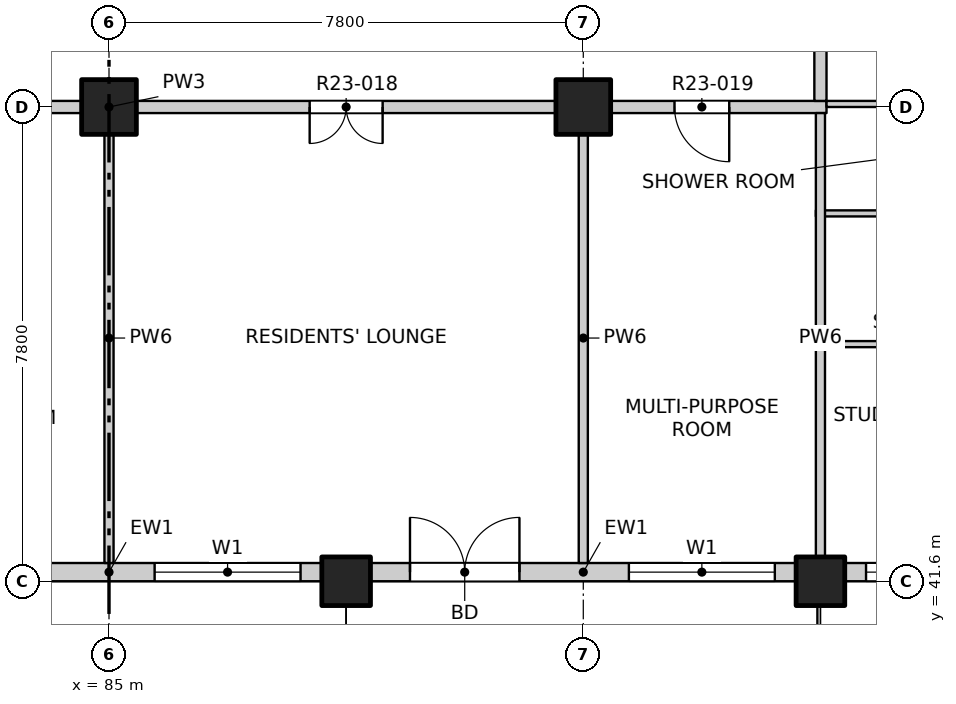
"""IFC4 building model, lengths in metres.
Left out: names, types, materials, properties, quantities, classifications, styles, units other than length and angle.
Written with IfcOpenShell. Run it as: python <this file> out.ifc"""

import sys

from ifc_helpers import new_model, si_unit, direction, frame, frame_2d, origin, origin_2d, place, context, subcontext, project, spatial, rectangle, extrude, element, fill, save


model = new_model("IFC4")
c1 = context("Model", 3, precision=1e-05, world=origin(), true_north=direction((0.0, 1.0)))
c2 = subcontext(c1, "Body", "Model", "MODEL_VIEW")
j1 = project(units=[si_unit("LENGTHUNIT", "METRE"), si_unit("PLANEANGLEUNIT", "RADIAN")], contexts=[c1])
p1 = place(None, origin())
s1 = spatial("IfcSite", under=j1, at=p1, CompositionType="ELEMENT")
p2 = place(p1, origin())
s2 = spatial("IfcBuilding", under=s1, at=p2, CompositionType="ELEMENT")
p3 = place(p2, frame((0.0, 0.0, 234.7)))
s3 = spatial("IfcBuildingStorey", under=s2, at=p3, CompositionType="ELEMENT", Elevation=234.7)
for number, where, z_axis, x_axis in (
    (1, (88.9, 41.6, -0.25), (0.0, 0.0, 1.0), (1.0, 0.0, 0.0)),
    (2, (96.7, 41.6, -0.25), (0.0, 0.0, 1.0), (1.0, 0.0, 0.0)),
):
    element("IfcColumn", number, at=place(p3, frame(where, z_axis=z_axis, x_axis=x_axis)), inside=s3, PredefinedType="COLUMN", context=c2, shape_type="SweptSolid", body=[
        extrude(rectangle(XDim=0.8, YDim=0.8, at=origin_2d()), origin(), (0.0, 0.0, 1.0), 3.4),
    ])
for number, where, z_axis, x_axis in (
    (3, (85.0, 49.4, -0.25), (0.0, 0.0, 1.0), (1.0, 0.0, 0.0)),
    (4, (92.8, 49.4, -0.25), (0.0, 0.0, 1.0), (1.0, 0.0, 0.0)),
):
    element("IfcColumn", number, at=place(p3, frame(where, z_axis=z_axis, x_axis=x_axis)), inside=s3, PredefinedType="COLUMN", context=c2, shape_type="SweptSolid", body=[
        extrude(rectangle(XDim=0.9, YDim=0.9, at=origin_2d()), origin(), (0.0, 0.0, 1.0), 3.4),
    ])
p4 = place(p3, frame((81.5, 41.75, 0.0), z_axis=(0.0, 0.0, 1.0), x_axis=(1.0, 0.0, 0.0)))
e5 = element("IfcWall", 5, at=p4, inside=s3, PredefinedType="SOLIDWALL", context=c2, shape_type="SweptSolid", body=[
    extrude(rectangle(XDim=7.0, YDim=0.3, at=frame_2d((3.5, 0.0))), origin(), (0.0, 0.0, 1.0), 2.7),
])
p5 = place(p4, frame((0.65, 0.0, 0.0)))
e6 = element("IfcOpeningElement", 6, at=p5, cuts=e5, PredefinedType="OPENING", context=c2, shape_type="SweptSolid", body=[
    extrude(rectangle(XDim=1.8, YDim=2.4, at=frame_2d((0.9, 1.2))), frame((0.0, 0.16, 0.0), z_axis=(0.0, -1.0, 0.0), x_axis=(1.0, 0.0, 0.0)), (0.0, 0.0, 1.0), 0.32),
])
p6 = place(p4, frame((4.25, 0.0, 0.9)))
e7 = element("IfcOpeningElement", 7, at=p6, cuts=e5, PredefinedType="OPENING", context=c2, shape_type="SweptSolid", body=[
    extrude(rectangle(XDim=2.4, YDim=1.8, at=frame_2d((1.2, 0.9))), frame((0.0, 0.16, 0.0), z_axis=(0.0, -1.0, 0.0), x_axis=(1.0, 0.0, 0.0)), (0.0, 0.0, 1.0), 0.32),
])
p7 = place(p3, frame((89.3, 41.75, 0.0), z_axis=(0.0, 0.0, 1.0), x_axis=(1.0, 0.0, 0.0)))
e8 = element("IfcWall", 8, at=p7, inside=s3, PredefinedType="SOLIDWALL", context=c2, shape_type="SweptSolid", body=[
    extrude(rectangle(XDim=7.0, YDim=0.3, at=frame_2d((3.5, 0.0))), origin(), (0.0, 0.0, 1.0), 2.7),
])
p8 = place(p7, frame((0.65, 0.0, 0.0)))
e9 = element("IfcOpeningElement", 9, at=p8, cuts=e8, PredefinedType="OPENING", context=c2, shape_type="SweptSolid", body=[
    extrude(rectangle(XDim=1.8, YDim=2.4, at=frame_2d((0.9, 1.2))), frame((0.0, 0.16, 0.0), z_axis=(0.0, -1.0, 0.0), x_axis=(1.0, 0.0, 0.0)), (0.0, 0.0, 1.0), 0.32),
])
p9 = place(p7, frame((4.25, 0.0, 0.9)))
e10 = element("IfcOpeningElement", 10, at=p9, cuts=e8, PredefinedType="OPENING", context=c2, shape_type="SweptSolid", body=[
    extrude(rectangle(XDim=2.4, YDim=1.8, at=frame_2d((1.2, 0.9))), frame((0.0, 0.16, 0.0), z_axis=(0.0, -1.0, 0.0), x_axis=(1.0, 0.0, 0.0)), (0.0, 0.0, 1.0), 0.32),
])
p10 = place(p3, frame((97.1, 41.75, 0.0), z_axis=(0.0, 0.0, 1.0), x_axis=(1.0, 0.0, 0.0)))
e11 = element("IfcWall", 11, at=p10, inside=s3, PredefinedType="SOLIDWALL", context=c2, shape_type="SweptSolid", body=[
    extrude(rectangle(XDim=7.4, YDim=0.3, at=frame_2d((3.7, 0.0))), origin(), (0.0, 0.0, 1.0), 2.7),
])
p11 = place(p10, frame((0.35, 0.0, 0.9)))
e12 = element("IfcOpeningElement", 12, at=p11, cuts=e11, PredefinedType="OPENING", context=c2, shape_type="SweptSolid", body=[
    extrude(rectangle(XDim=2.4, YDim=1.8, at=frame_2d((1.2, 0.9))), frame((0.0, 0.16, 0.0), z_axis=(0.0, -1.0, 0.0), x_axis=(1.0, 0.0, 0.0)), (0.0, 0.0, 1.0), 0.32),
])
p12 = place(p10, frame((4.25, 0.0, 0.9)))
e13 = element("IfcOpeningElement", 13, at=p12, cuts=e11, PredefinedType="OPENING", context=c2, shape_type="SweptSolid", body=[
    extrude(rectangle(XDim=2.4, YDim=1.8, at=frame_2d((1.2, 0.9))), frame((0.0, 0.16, 0.0), z_axis=(0.0, -1.0, 0.0), x_axis=(1.0, 0.0, 0.0)), (0.0, 0.0, 1.0), 0.32),
])
p13 = place(p3, frame((96.625, 45.5, 0.0), z_axis=(0.0, 0.0, 1.0), x_axis=(1.0, 0.0, 0.0)))
e14 = element("IfcWall", 14, at=p13, inside=s3, PredefinedType="PARTITIONING", context=c2, shape_type="SweptSolid", body=[
    extrude(rectangle(XDim=11.475, YDim=0.1, at=frame_2d((5.738, 0.0))), origin(), (0.0, 0.0, 1.0), 3.15),
])
p14 = place(p13, frame((2.61, 0.0, 0.0)))
e15 = element("IfcOpeningElement", 15, at=p14, cuts=e14, PredefinedType="OPENING", context=c2, shape_type="SweptSolid", body=[
    extrude(rectangle(XDim=0.9, YDim=2.1, at=frame_2d((0.45, 1.05))), frame((0.0, 0.06, 0.0), z_axis=(0.0, -1.0, 0.0), x_axis=(1.0, 0.0, 0.0)), (0.0, 0.0, 1.0), 0.12),
])
p15 = place(p3, frame((96.625, 47.65, 0.0), z_axis=(0.0, 0.0, 1.0), x_axis=(1.0, 0.0, 0.0)))
e16 = element("IfcWall", 16, at=p15, inside=s3, PredefinedType="PARTITIONING", context=c2, shape_type="SweptSolid", body=[
    extrude(rectangle(XDim=2.195, YDim=0.1, at=frame_2d((1.098, 0.0))), origin(), (0.0, 0.0, 1.0), 3.15),
])
p16 = place(p3, frame((73.2, 49.4, 0.0), z_axis=(0.0, 0.0, 1.0), x_axis=(1.0, 0.0, 0.0)))
e17 = element("IfcWall", 17, at=p16, inside=s3, PredefinedType="PARTITIONING", context=c2, shape_type="SweptSolid", body=[
    extrude(rectangle(XDim=23.6, YDim=0.2, at=frame_2d((11.8, 0.0))), origin(), (0.0, 0.0, 1.0), 3.15),
])
p17 = place(p16, frame((2.25, 0.0, 0.0)))
e18 = element("IfcOpeningElement", 18, at=p17, cuts=e17, PredefinedType="OPENING", context=c2, shape_type="SweptSolid", body=[
    extrude(rectangle(XDim=1.2, YDim=2.1, at=frame_2d((0.6, 1.05))), frame((0.0, 0.11, 0.0), z_axis=(0.0, -1.0, 0.0), x_axis=(1.0, 0.0, 0.0)), (0.0, 0.0, 1.0), 0.22),
])
p18 = place(p16, frame((9.4, 0.0, 0.0)))
e19 = element("IfcOpeningElement", 19, at=p18, cuts=e17, PredefinedType="OPENING", context=c2, shape_type="SweptSolid", body=[
    extrude(rectangle(XDim=0.9, YDim=2.1, at=frame_2d((0.45, 1.05))), frame((0.0, 0.11, 0.0), z_axis=(0.0, -1.0, 0.0), x_axis=(1.0, 0.0, 0.0)), (0.0, 0.0, 1.0), 0.22),
])
p19 = place(p16, frame((15.1, 0.0, 0.0)))
e20 = element("IfcOpeningElement", 20, at=p19, cuts=e17, PredefinedType="OPENING", context=c2, shape_type="SweptSolid", body=[
    extrude(rectangle(XDim=1.2, YDim=2.1, at=frame_2d((0.6, 1.05))), frame((0.0, 0.11, 0.0), z_axis=(0.0, -1.0, 0.0), x_axis=(1.0, 0.0, 0.0)), (0.0, 0.0, 1.0), 0.22),
])
p20 = place(p16, frame((21.1, 0.0, 0.0)))
e21 = element("IfcOpeningElement", 21, at=p20, cuts=e17, PredefinedType="OPENING", context=c2, shape_type="SweptSolid", body=[
    extrude(rectangle(XDim=0.9, YDim=2.1, at=frame_2d((0.45, 1.05))), frame((0.0, 0.11, 0.0), z_axis=(0.0, -1.0, 0.0), x_axis=(1.0, 0.0, 0.0)), (0.0, 0.0, 1.0), 0.22),
])
p21 = place(p3, frame((96.8, 49.45, 0.0), z_axis=(0.0, 0.0, 1.0), x_axis=(1.0, 0.0, 0.0)))
e22 = element("IfcWall", 22, at=p21, inside=s3, PredefinedType="PARTITIONING", context=c2, shape_type="SweptSolid", body=[
    extrude(rectangle(XDim=2.02, YDim=0.1, at=frame_2d((1.01, 0.0))), origin(), (0.0, 0.0, 1.0), 3.15),
])
for number, where, z_axis, x_axis in (
    (23, (85.0, 41.9, 0.0), (0.0, 0.0, 1.0), (0.0, 1.0, 0.0)),
    (24, (92.8, 41.9, 0.0), (0.0, 0.0, 1.0), (0.0, 1.0, 0.0)),
    (25, (96.7, 41.9, 0.0), (0.0, 0.0, 1.0), (0.0, 1.0, 0.0)),
):
    element("IfcWall", number, at=place(p3, frame(where, z_axis=z_axis, x_axis=x_axis)), inside=s3, PredefinedType="PARTITIONING", context=c2, shape_type="SweptSolid", body=[
        extrude(rectangle(XDim=7.4, YDim=0.15, at=frame_2d((3.7, 0.0))), origin(), (0.0, 0.0, 1.0), 3.15),
    ])
p22 = place(p3, frame((96.7, 49.5, 0.0), z_axis=(0.0, 0.0, 1.0), x_axis=(0.0, 1.0, 0.0)))
e26 = element("IfcWall", 26, at=p22, inside=s3, PredefinedType="PARTITIONING", context=c2, shape_type="SweptSolid", body=[
    extrude(rectangle(XDim=34.9, YDim=0.2, at=frame_2d((17.45, 0.0))), origin(), (0.0, 0.0, 1.0), 3.15),
])
p23 = place(p22, frame((3.175, 0.0, 0.0)))
e27 = element("IfcOpeningElement", 27, at=p23, cuts=e26, PredefinedType="OPENING", context=c2, shape_type="SweptSolid", body=[
    extrude(rectangle(XDim=1.0, YDim=2.1, at=frame_2d((0.5, 1.05))), frame((0.0, 0.11, 0.0), z_axis=(0.0, -1.0, 0.0), x_axis=(1.0, 0.0, 0.0)), (0.0, 0.0, 1.0), 0.22),
])
p24 = place(p22, frame((14.625, 0.0, 0.0)))
e28 = element("IfcOpeningElement", 28, at=p24, cuts=e26, PredefinedType="OPENING", context=c2, shape_type="SweptSolid", body=[
    extrude(rectangle(XDim=1.0, YDim=2.1, at=frame_2d((0.5, 1.05))), frame((0.0, 0.11, 0.0), z_axis=(0.0, -1.0, 0.0), x_axis=(1.0, 0.0, 0.0)), (0.0, 0.0, 1.0), 0.22),
])
p25 = place(p22, frame((30.175, 0.0, 0.0)))
e29 = element("IfcOpeningElement", 29, at=p25, cuts=e26, PredefinedType="OPENING", context=c2, shape_type="SweptSolid", body=[
    extrude(rectangle(XDim=1.0, YDim=2.1, at=frame_2d((0.5, 1.05))), frame((0.0, 0.11, 0.0), z_axis=(0.0, -1.0, 0.0), x_axis=(1.0, 0.0, 0.0)), (0.0, 0.0, 1.0), 0.22),
])
p26 = place(p6, origin())
e30 = element("IfcWindow", 30, at=p26, inside=s3, PartitioningType="DOUBLE_PANEL_VERTICAL", PredefinedType="WINDOW", context=c2, shape_type="SweptSolid", body=[
    extrude(rectangle(XDim=2.4, YDim=1.8, at=frame_2d((1.2, 0.9))), frame((0.0, 0.03, 0.0), z_axis=(0.0, -1.0, 0.0), x_axis=(1.0, 0.0, 0.0)), (0.0, 0.0, 1.0), 0.06),
])
fill(e7, e30)
p27 = place(p8, origin())
e31 = element("IfcDoor", 31, at=p27, inside=s3, OperationType="DOUBLE_DOOR_SINGLE_SWING", PredefinedType="DOOR", context=c2, shape_type="SweptSolid", body=[
    extrude(rectangle(XDim=1.8, YDim=2.4, at=frame_2d((0.9, 1.2))), frame((0.0, 0.025, 0.0), z_axis=(0.0, -1.0, 0.0), x_axis=(1.0, 0.0, 0.0)), (0.0, 0.0, 1.0), 0.05),
])
fill(e9, e31)
p28 = place(p9, origin())
e32 = element("IfcWindow", 32, at=p28, inside=s3, PartitioningType="DOUBLE_PANEL_VERTICAL", PredefinedType="WINDOW", context=c2, shape_type="SweptSolid", body=[
    extrude(rectangle(XDim=2.4, YDim=1.8, at=frame_2d((1.2, 0.9))), frame((0.0, 0.03, 0.0), z_axis=(0.0, -1.0, 0.0), x_axis=(1.0, 0.0, 0.0)), (0.0, 0.0, 1.0), 0.06),
])
fill(e10, e32)
p29 = place(p11, origin())
e33 = element("IfcWindow", 33, at=p29, inside=s3, PartitioningType="DOUBLE_PANEL_VERTICAL", PredefinedType="WINDOW", context=c2, shape_type="SweptSolid", body=[
    extrude(rectangle(XDim=2.4, YDim=1.8, at=frame_2d((1.2, 0.9))), frame((0.0, 0.03, 0.0), z_axis=(0.0, -1.0, 0.0), x_axis=(1.0, 0.0, 0.0)), (0.0, 0.0, 1.0), 0.06),
])
fill(e12, e33)
p30 = place(p19, origin())
e34 = element("IfcDoor", 34, at=p30, inside=s3, OperationType="DOUBLE_DOOR_SINGLE_SWING", PredefinedType="DOOR", context=c2, shape_type="SweptSolid", body=[
    extrude(rectangle(XDim=1.2, YDim=2.1, at=frame_2d((0.6, 1.05))), frame((0.0, 0.025, 0.0), z_axis=(0.0, -1.0, 0.0), x_axis=(1.0, 0.0, 0.0)), (0.0, 0.0, 1.0), 0.05),
])
fill(e20, e34)
p31 = place(p20, origin())
e35 = element("IfcDoor", 35, at=p31, inside=s3, OperationType="SINGLE_SWING_LEFT", PredefinedType="DOOR", context=c2, shape_type="SweptSolid", body=[
    extrude(rectangle(XDim=0.9, YDim=2.1, at=frame_2d((0.45, 1.05))), frame((0.0, 0.025, 0.0), z_axis=(0.0, -1.0, 0.0), x_axis=(1.0, 0.0, 0.0)), (0.0, 0.0, 1.0), 0.05),
])
fill(e21, e35)
save(model, sys.argv[1])
